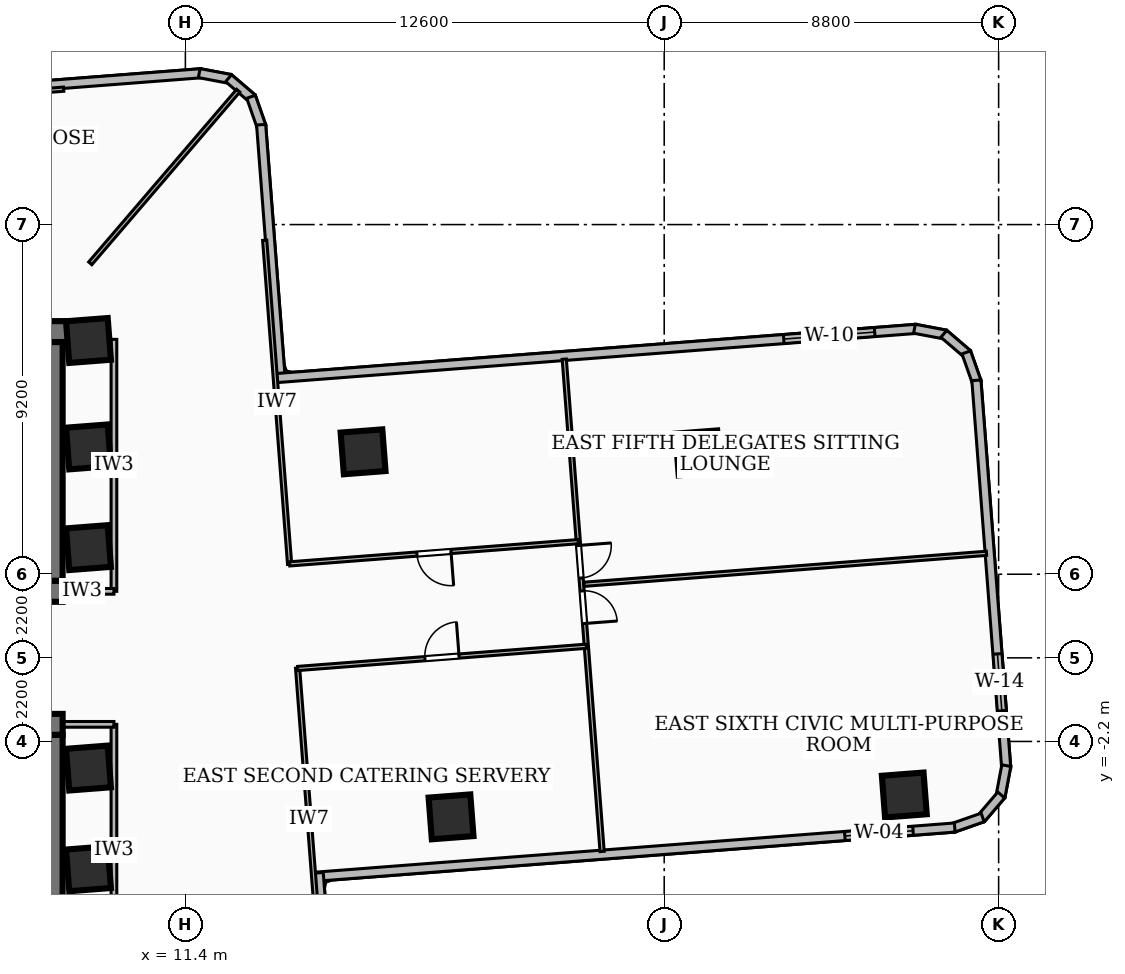
"""IFC4 building model, lengths in metres.
Left out: names, types, materials, properties, quantities, classifications, styles, units other than length and angle.
Written with IfcOpenShell. Run it as: python <this file> out.ifc"""

import sys

from ifc_helpers import new_model, si_unit, direction, frame, frame_2d, origin, origin_2d, place, context, subcontext, project, spatial, rectangle, extrude, element, fill, save


model = new_model("IFC4")
c1 = context("Model", 3, precision=1e-05, world=origin(), true_north=direction((0.0, 1.0)))
c2 = subcontext(c1, "Body", "Model", "MODEL_VIEW")
j1 = project(units=[si_unit("LENGTHUNIT", "METRE"), si_unit("PLANEANGLEUNIT", "RADIAN")], contexts=[c1])
p1 = place(None, origin())
s1 = spatial("IfcSite", under=j1, at=p1, CompositionType="ELEMENT")
p2 = place(p1, origin())
s2 = spatial("IfcBuilding", under=s1, at=p2, CompositionType="ELEMENT")
p3 = place(p2, frame((0.0, 0.0, 56.88)))
s3 = spatial("IfcBuildingStorey", under=s2, at=p3, CompositionType="ELEMENT", Elevation=56.88)
p4 = place(p3, frame((-8.78, 8.585, 0.0), z_axis=(0.0, 0.0, 1.0), x_axis=(1.0, 0.0, 0.0)))
e1 = element("IfcWall", 1, at=p4, inside=s3, PredefinedType="SHEAR", context=c2, shape_type="SweptSolid", body=[
    extrude(rectangle(XDim=17.56, YDim=0.55, at=frame_2d((8.78, 0.0))), origin(), (0.0, 0.0, 1.0), 3.32),
])
p5 = place(p3, frame((8.17, 1.75, 0.0), z_axis=(0.0, 0.0, 1.0), x_axis=(-1.0, 0.0, 0.0)))
e2 = element("IfcWall", 2, at=p5, inside=s3, PredefinedType="SHEAR", context=c2, shape_type="SweptSolid", body=[
    extrude(rectangle(XDim=16.34, YDim=0.55, at=frame_2d((8.17, 0.0))), origin(), (0.0, 0.0, 1.0), 3.32),
])
p6 = place(p5, frame((7.45, 0.0, 0.0)))
e3 = element("IfcOpeningElement", 3, at=p6, cuts=e2, PredefinedType="OPENING", context=c2, shape_type="SweptSolid", body=[
    extrude(rectangle(XDim=1.0, YDim=2.1, at=frame_2d((0.5, 1.05))), frame((0.0, 0.285, 0.0), z_axis=(0.0, -1.0, 0.0), x_axis=(1.0, 0.0, 0.0)), (0.0, 0.0, 1.0), 0.57),
])
p7 = place(p5, frame((3.4, 0.0, 0.0)))
e4 = element("IfcOpeningElement", 4, at=p7, cuts=e2, PredefinedType="OPENING", context=c2, shape_type="SweptSolid", body=[
    extrude(rectangle(XDim=0.9, YDim=2.06, at=frame_2d((0.45, 1.03))), frame((0.0, 0.285, 0.0), z_axis=(0.0, -1.0, 0.0), x_axis=(1.0, 0.0, 0.0)), (0.0, 0.0, 1.0), 0.57),
])
p8 = place(p5, frame((1.1, 0.0, 0.0)))
e5 = element("IfcOpeningElement", 5, at=p8, cuts=e2, PredefinedType="OPENING", context=c2, shape_type="SweptSolid", body=[
    extrude(rectangle(XDim=0.9, YDim=2.06, at=frame_2d((0.45, 1.03))), frame((0.0, 0.285, 0.0), z_axis=(0.0, -1.0, 0.0), x_axis=(1.0, 0.0, 0.0)), (0.0, 0.0, 1.0), 0.57),
])
p9 = place(p3, frame((7.895, 8.31, 0.0), z_axis=(0.0, 0.0, 1.0), x_axis=(0.0, -1.0, 0.0)))
e6 = element("IfcWall", 6, at=p9, inside=s3, PredefinedType="SHEAR", context=c2, shape_type="SweptSolid", body=[
    extrude(rectangle(XDim=6.285, YDim=0.55, at=frame_2d((3.143, 0.0))), origin(), (0.0, 0.0, 1.0), 3.32),
])
p10 = place(p3, frame((-8.17, -1.75, 0.0), z_axis=(0.0, 0.0, 1.0), x_axis=(1.0, 0.0, 0.0)))
e7 = element("IfcWall", 7, at=p10, inside=s3, PredefinedType="SHEAR", context=c2, shape_type="SweptSolid", body=[
    extrude(rectangle(XDim=16.34, YDim=0.55, at=frame_2d((8.17, 0.0))), origin(), (0.0, 0.0, 1.0), 3.32),
])
p11 = place(p10, frame((7.45, 0.0, 0.0)))
e8 = element("IfcOpeningElement", 8, at=p11, cuts=e7, PredefinedType="OPENING", context=c2, shape_type="SweptSolid", body=[
    extrude(rectangle(XDim=1.0, YDim=2.1, at=frame_2d((0.5, 1.05))), frame((0.0, 0.285, 0.0), z_axis=(0.0, -1.0, 0.0), x_axis=(1.0, 0.0, 0.0)), (0.0, 0.0, 1.0), 0.57),
])
p12 = place(p10, frame((10.965, 0.0, 0.0)))
e9 = element("IfcOpeningElement", 9, at=p12, cuts=e7, PredefinedType="OPENING", context=c2, shape_type="SweptSolid", body=[
    extrude(rectangle(XDim=1.05, YDim=2.15, at=frame_2d((0.525, 1.075))), frame((0.0, 0.285, 0.0), z_axis=(0.0, -1.0, 0.0), x_axis=(1.0, 0.0, 0.0)), (0.0, 0.0, 1.0), 0.57),
])
p13 = place(p10, frame((12.525, 0.0, 0.0)))
e10 = element("IfcOpeningElement", 10, at=p13, cuts=e7, PredefinedType="OPENING", context=c2, shape_type="SweptSolid", body=[
    extrude(rectangle(XDim=1.05, YDim=2.15, at=frame_2d((0.525, 1.075))), frame((0.0, 0.285, 0.0), z_axis=(0.0, -1.0, 0.0), x_axis=(1.0, 0.0, 0.0)), (0.0, 0.0, 1.0), 0.57),
])
p14 = place(p10, frame((14.085, 0.0, 0.0)))
e11 = element("IfcOpeningElement", 11, at=p14, cuts=e7, PredefinedType="OPENING", context=c2, shape_type="SweptSolid", body=[
    extrude(rectangle(XDim=1.05, YDim=2.15, at=frame_2d((0.525, 1.075))), frame((0.0, 0.285, 0.0), z_axis=(0.0, -1.0, 0.0), x_axis=(1.0, 0.0, 0.0)), (0.0, 0.0, 1.0), 0.57),
])
p15 = place(p3, frame((7.895, -2.025, 0.0), z_axis=(0.0, 0.0, 1.0), x_axis=(0.0, -1.0, 0.0)))
e12 = element("IfcWall", 12, at=p15, inside=s3, PredefinedType="SHEAR", context=c2, shape_type="SweptSolid", body=[
    extrude(rectangle(XDim=6.285, YDim=0.55, at=frame_2d((3.143, 0.0))), origin(), (0.0, 0.0, 1.0), 3.32),
])
for number, where, z_axis, x_axis in (
    (13, (8.85, -5.55, 0.0), (0.0, 0.0, 1.0), (0.997, 0.077, 0.0)),
    (14, (8.85, -2.9, 0.0), (0.0, 0.0, 1.0), (0.997, 0.077, 0.0)),
    (15, (8.85, 2.9, 0.0), (0.0, 0.0, 1.0), (0.997, 0.077, 0.0)),
    (16, (8.85, 5.55, 0.0), (0.0, 0.0, 1.0), (0.997, 0.077, 0.0)),
    (17, (8.85, 8.35, 0.0), (0.0, 0.0, 1.0), (0.997, 0.077, 0.0)),
    (18, (18.391, -4.184, 0.0), (0.0, 0.0, 1.0), (0.997, 0.077, 0.0)),
    (19, (16.076, 5.421, 0.0), (0.0, 0.0, 1.0), (0.997, 0.077, 0.0)),
    (20, (30.318, -3.609, 0.0), (0.0, 0.0, 1.0), (0.997, 0.077, 0.0)),
    (21, (24.888, 5.393, 0.0), (0.0, 0.0, 1.0), (0.997, 0.077, 0.0)),
):
    element("IfcColumn", number, at=place(p3, frame(where, z_axis=z_axis, x_axis=x_axis)), inside=s3, PredefinedType="COLUMN", context=c2, shape_type="SweptSolid", body=[
        extrude(rectangle(XDim=1.1, YDim=1.1, at=origin_2d()), origin(), (0.0, 0.0, 1.0), 3.6),
    ])
p16 = place(p3, frame((5.657, 14.908, 0.0), z_axis=(0.0, 0.0, 1.0), x_axis=(0.997048202977, 0.076778128006, 0.0)))
e22 = element("IfcWall", 22, at=p16, inside=s3, PredefinedType="SOLIDWALL", context=c2, shape_type="SweptSolid", body=[
    extrude(rectangle(XDim=6.175, YDim=0.24, at=frame_2d((3.088, 0.0))), origin(), (0.0, 0.0, 1.0), 2.401),
])
p17 = place(p3, frame((11.764, 15.385, 0.0), z_axis=(0.0, 0.0, 1.0), x_axis=(0.982688894005, -0.185263427582, 0.0)))
e23 = element("IfcWall", 23, at=p17, inside=s3, PredefinedType="SOLIDWALL", context=c2, shape_type="SweptSolid", body=[
    extrude(rectangle(XDim=0.832, YDim=0.24, at=frame_2d((0.416, 0.0))), origin(), (0.0, 0.0, 1.0), 3.32),
])
p18 = place(p3, frame((12.537, 15.252, 0.0), z_axis=(0.0, 0.0, 1.0), x_axis=(0.759616636226, -0.650371098657, 0.0)))
e24 = element("IfcWall", 24, at=p18, inside=s3, PredefinedType="SOLIDWALL", context=c2, shape_type="SweptSolid", body=[
    extrude(rectangle(XDim=0.813, YDim=0.24, at=frame_2d((0.407, 0.0))), origin(), (0.0, 0.0, 1.0), 3.32),
])
p19 = place(p3, frame((13.128, 14.763, 0.0), z_axis=(0.0, 0.0, 1.0), x_axis=(0.331174926, -0.943569376564, 0.0)))
e25 = element("IfcWall", 25, at=p19, inside=s3, PredefinedType="SOLIDWALL", context=c2, shape_type="SweptSolid", body=[
    extrude(rectangle(XDim=0.831, YDim=0.24, at=frame_2d((0.416, 0.0))), origin(), (0.0, 0.0, 1.0), 3.32),
])
p20 = place(p3, frame((13.393, 14.028, 0.0), z_axis=(0.0, 0.0, 1.0), x_axis=(0.076754366588, -0.997050032451, 0.0)))
e26 = element("IfcWall", 26, at=p20, inside=s3, PredefinedType="SOLIDWALL", context=c2, shape_type="SweptSolid", body=[
    extrude(rectangle(XDim=6.775, YDim=0.24, at=frame_2d((3.388, 0.0))), origin(), (0.0, 0.0, 1.0), 3.32),
])
p21 = place(p3, frame((13.81, 7.362, 0.0), z_axis=(0.0, 0.0, 1.0), x_axis=(0.997055761943, 0.076679903335, 0.0)))
e27 = element("IfcWall", 27, at=p21, inside=s3, PredefinedType="SOLIDWALL", context=c2, shape_type="SweptSolid", body=[
    extrude(rectangle(XDim=16.875, YDim=0.24, at=frame_2d((8.438, 0.0))), origin(), (0.0, 0.0, 1.0), 3.32),
])
p22 = place(p21, frame((13.375, 0.0, 0.85)))
e28 = element("IfcOpeningElement", 28, at=p22, cuts=e27, PredefinedType="OPENING", context=c2, shape_type="SweptSolid", body=[
    extrude(rectangle(XDim=2.4, YDim=1.65, at=frame_2d((1.2, 0.825))), frame((0.0, 0.13, 0.0), z_axis=(0.0, -1.0, 0.0), x_axis=(1.0, 0.0, 0.0)), (0.0, 0.0, 1.0), 0.26),
])
p23 = place(p3, frame((30.585, 8.659, 0.0), z_axis=(0.0, 0.0, 1.0), x_axis=(0.982688894005, -0.185263427582, 0.0)))
e29 = element("IfcWall", 29, at=p23, inside=s3, PredefinedType="SOLIDWALL", context=c2, shape_type="SweptSolid", body=[
    extrude(rectangle(XDim=0.832, YDim=0.24, at=frame_2d((0.416, 0.0))), origin(), (0.0, 0.0, 1.0), 3.32),
])
p24 = place(p3, frame((31.358, 8.526, 0.0), z_axis=(0.0, 0.0, 1.0), x_axis=(0.759891778471, -0.650049601962, 0.0)))
e30 = element("IfcWall", 30, at=p24, inside=s3, PredefinedType="SOLIDWALL", context=c2, shape_type="SweptSolid", body=[
    extrude(rectangle(XDim=0.813, YDim=0.24, at=frame_2d((0.407, 0.0))), origin(), (0.0, 0.0, 1.0), 3.32),
])
p25 = place(p3, frame((31.949, 8.037, 0.0), z_axis=(0.0, 0.0, 1.0), x_axis=(0.332128799234, -0.943234043448, 0.0)))
e31 = element("IfcWall", 31, at=p25, inside=s3, PredefinedType="SOLIDWALL", context=c2, shape_type="SweptSolid", body=[
    extrude(rectangle(XDim=0.831, YDim=0.24, at=frame_2d((0.416, 0.0))), origin(), (0.0, 0.0, 1.0), 3.32),
])
p26 = place(p3, frame((32.215, 7.302, 0.0), z_axis=(0.0, 0.0, 1.0), x_axis=(0.076720251263, -0.997052658111, 0.0)))
e32 = element("IfcWall", 32, at=p26, inside=s3, PredefinedType="SOLIDWALL", context=c2, shape_type="SweptSolid", body=[
    extrude(rectangle(XDim=10.218, YDim=0.24, at=frame_2d((5.109, 0.0))), origin(), (0.0, 0.0, 1.0), 3.32),
])
p27 = place(p26, frame((7.22, 0.0, 0.85)))
e33 = element("IfcOpeningElement", 33, at=p27, cuts=e32, PredefinedType="OPENING", context=c2, shape_type="SweptSolid", body=[
    extrude(rectangle(XDim=1.5, YDim=1.5, at=frame_2d((0.75, 0.75))), frame((0.0, 0.13, 0.0), z_axis=(0.0, -1.0, 0.0), x_axis=(1.0, 0.0, 0.0)), (0.0, 0.0, 1.0), 0.26),
])
p28 = place(p3, frame((33.002, -2.836, 0.0), z_axis=(0.0, 0.0, 1.0), x_axis=(-0.185263427582, -0.982688894005, 0.0)))
e34 = element("IfcWall", 34, at=p28, inside=s3, PredefinedType="SOLIDWALL", context=c2, shape_type="SweptSolid", body=[
    extrude(rectangle(XDim=0.832, YDim=0.24, at=frame_2d((0.416, 0.0))), origin(), (0.0, 0.0, 1.0), 3.32),
])
p29 = place(p3, frame((32.869, -3.609, 0.0), z_axis=(0.0, 0.0, 1.0), x_axis=(-0.650049601962, -0.759891778471, 0.0)))
e35 = element("IfcWall", 35, at=p29, inside=s3, PredefinedType="SOLIDWALL", context=c2, shape_type="SweptSolid", body=[
    extrude(rectangle(XDim=0.813, YDim=0.24, at=frame_2d((0.407, 0.0))), origin(), (0.0, 0.0, 1.0), 3.32),
])
p30 = place(p3, frame((32.38, -4.2, 0.0), z_axis=(0.0, 0.0, 1.0), x_axis=(-0.943569376564, -0.331174926, 0.0)))
e36 = element("IfcWall", 36, at=p30, inside=s3, PredefinedType="SOLIDWALL", context=c2, shape_type="SweptSolid", body=[
    extrude(rectangle(XDim=0.831, YDim=0.24, at=frame_2d((0.416, 0.0))), origin(), (0.0, 0.0, 1.0), 3.32),
])
p31 = place(p3, frame((31.645, -4.465, 0.0), z_axis=(0.0, 0.0, 1.0), x_axis=(-0.997051676532, -0.076733006752, 0.0)))
e37 = element("IfcWall", 37, at=p31, inside=s3, PredefinedType="SOLIDWALL", context=c2, shape_type="SweptSolid", body=[
    extrude(rectangle(XDim=16.876, YDim=0.24, at=frame_2d((8.438, 0.0))), origin(), (0.0, 0.0, 1.0), 3.32),
])
p32 = place(p31, frame((1.1, 0.0, 0.85)))
e38 = element("IfcOpeningElement", 38, at=p32, cuts=e37, PredefinedType="OPENING", context=c2, shape_type="SweptSolid", body=[
    extrude(rectangle(XDim=1.8, YDim=2.0, at=frame_2d((0.9, 1.0))), frame((0.0, 0.13, 0.0), z_axis=(0.0, -1.0, 0.0), x_axis=(1.0, 0.0, 0.0)), (0.0, 0.0, 1.0), 0.26),
])
p33 = place(p3, frame((14.908, -5.657, 0.0), z_axis=(0.0, 0.0, 1.0), x_axis=(0.076778128006, -0.997048202977, 0.0)))
e39 = element("IfcWall", 39, at=p33, inside=s3, PredefinedType="SOLIDWALL", context=c2, shape_type="SweptSolid", body=[
    extrude(rectangle(XDim=6.175, YDim=0.24, at=frame_2d((3.088, 0.0))), origin(), (0.0, 0.0, 1.0), 3.32),
])
p34 = place(p3, frame((9.52, 1.75, 0.0), z_axis=(0.0, 0.0, 1.0), x_axis=(0.0, 1.0, 0.0)))
e40 = element("IfcWall", 40, at=p34, inside=s3, PredefinedType="PARTITIONING", context=c2, shape_type="SweptSolid", body=[
    extrude(rectangle(XDim=6.63, YDim=0.15, at=frame_2d((3.315, 0.0))), origin(), (0.0, 0.0, 1.0), 2.401),
])
p35 = place(p3, frame((7.85, 1.75, 0.0), z_axis=(0.0, 0.0, 1.0), x_axis=(1.0, 0.0, 0.0)))
e41 = element("IfcWall", 41, at=p35, inside=s3, PredefinedType="PARTITIONING", context=c2, shape_type="SweptSolid", body=[
    extrude(rectangle(XDim=1.67, YDim=0.15, at=frame_2d((0.835, 0.0))), origin(), (0.0, 0.0, 1.0), 2.385),
])
p36 = place(p3, frame((9.52, -8.38, 0.0), z_axis=(0.0, 0.0, 1.0), x_axis=(0.0, 1.0, 0.0)))
e42 = element("IfcWall", 42, at=p36, inside=s3, PredefinedType="PARTITIONING", context=c2, shape_type="SweptSolid", body=[
    extrude(rectangle(XDim=6.63, YDim=0.15, at=frame_2d((3.315, 0.0))), origin(), (0.0, 0.0, 1.0), 2.401),
])
p37 = place(p3, frame((7.85, -1.75, 0.0), z_axis=(0.0, 0.0, 1.0), x_axis=(1.0, 0.0, 0.0)))
e43 = element("IfcWall", 43, at=p37, inside=s3, PredefinedType="PARTITIONING", context=c2, shape_type="SweptSolid", body=[
    extrude(rectangle(XDim=1.67, YDim=0.15, at=frame_2d((0.835, 0.0))), origin(), (0.0, 0.0, 1.0), 2.385),
])
p38 = place(p3, frame((8.897, 10.38, 0.0), z_axis=(0.0, 0.0, 1.0), x_axis=(0.650777932984, 0.759268122564, 0.0)))
e44 = element("IfcWall", 44, at=p38, inside=s3, PredefinedType="PARTITIONING", context=c2, shape_type="SweptSolid", body=[
    extrude(rectangle(XDim=5.984, YDim=0.11, at=frame_2d((2.992, 0.0))), origin(), (0.0, 0.0, 1.0), 3.32),
])
p39 = place(p3, frame((14.143, 2.462, 0.0), z_axis=(0.0, 0.0, 1.0), x_axis=(-0.076722700704, 0.997052469631, 0.0)))
e45 = element("IfcWall", 45, at=p39, inside=s3, PredefinedType="PARTITIONING", context=c2, shape_type="SweptSolid", body=[
    extrude(rectangle(XDim=8.55, YDim=0.11, at=frame_2d((4.275, 0.0))), origin(), (0.0, 0.0, 1.0), 2.401),
])
p40 = place(p3, frame((14.963, -8.197, 0.0), z_axis=(0.0, 0.0, 1.0), x_axis=(-0.076708240121, 0.99705358226, 0.0)))
e46 = element("IfcWall", 46, at=p40, inside=s3, PredefinedType="PARTITIONING", context=c2, shape_type="SweptSolid", body=[
    extrude(rectangle(XDim=7.95, YDim=0.11, at=frame_2d((3.975, 0.0))), origin(), (0.0, 0.0, 1.0), 2.401),
])
p41 = place(p3, frame((21.74, 3.057, 0.0), z_axis=(0.0, 0.0, 1.0), x_axis=(-0.997049394946, -0.076762647418, 0.0)))
e47 = element("IfcWall", 47, at=p41, inside=s3, PredefinedType="PARTITIONING", context=c2, shape_type="SweptSolid", body=[
    extrude(rectangle(XDim=7.62, YDim=0.11, at=frame_2d((3.81, 0.0))), origin(), (0.0, 0.0, 1.0), 3.32),
])
p42 = place(p41, frame((3.36, 0.0, 0.0)))
e48 = element("IfcOpeningElement", 48, at=p42, cuts=e47, PredefinedType="OPENING", context=c2, shape_type="SweptSolid", body=[
    extrude(rectangle(XDim=0.9, YDim=2.06, at=frame_2d((0.45, 1.03))), frame((0.0, 0.065, 0.0), z_axis=(0.0, -1.0, 0.0), x_axis=(1.0, 0.0, 0.0)), (0.0, 0.0, 1.0), 0.13),
])
p43 = place(p3, frame((14.354, -0.28, 0.0), z_axis=(0.0, 0.0, 1.0), x_axis=(0.997048639669, 0.076772456877, 0.0)))
e49 = element("IfcWall", 49, at=p43, inside=s3, PredefinedType="PARTITIONING", context=c2, shape_type="SweptSolid", body=[
    extrude(rectangle(XDim=7.619, YDim=0.11, at=frame_2d((3.81, 0.0))), origin(), (0.0, 0.0, 1.0), 3.32),
])
p44 = place(p43, frame((3.36, 0.0, 0.0)))
e50 = element("IfcOpeningElement", 50, at=p44, cuts=e49, PredefinedType="OPENING", context=c2, shape_type="SweptSolid", body=[
    extrude(rectangle(XDim=0.9, YDim=2.06, at=frame_2d((0.45, 1.03))), frame((0.0, 0.065, 0.0), z_axis=(0.0, -1.0, 0.0), x_axis=(1.0, 0.0, 0.0)), (0.0, 0.0, 1.0), 0.13),
])
p45 = place(p3, frame((21.886, 1.935, 0.0), z_axis=(0.0, 0.0, 1.0), x_axis=(0.997054350339, 0.076698255973, 0.0)))
e51 = element("IfcWall", 51, at=p45, inside=s3, PredefinedType="PARTITIONING", context=c2, shape_type="SweptSolid", body=[
    extrude(rectangle(XDim=10.625, YDim=0.11, at=frame_2d((5.312, 0.0))), origin(), (0.0, 0.0, 1.0), 2.812),
])
p46 = place(p3, frame((21.37, 7.858, 0.0), z_axis=(0.0, 0.0, 1.0), x_axis=(0.076662005745, -0.99705713822, 0.0)))
e52 = element("IfcWall", 52, at=p46, inside=s3, PredefinedType="PARTITIONING", context=c2, shape_type="SweptSolid", body=[
    extrude(rectangle(XDim=12.99, YDim=0.11, at=frame_2d((6.495, 0.0))), origin(), (0.0, 0.0, 1.0), 2.401),
])
p47 = place(p46, frame((6.115, 0.0, 0.0)))
e53 = element("IfcOpeningElement", 53, at=p47, cuts=e52, PredefinedType="OPENING", context=c2, shape_type="SweptSolid", body=[
    extrude(rectangle(XDim=0.86, YDim=2.04, at=frame_2d((0.43, 1.02))), frame((0.0, 0.065, 0.0), z_axis=(0.0, -1.0, 0.0), x_axis=(1.0, 0.0, 0.0)), (0.0, 0.0, 1.0), 0.13),
])
p48 = place(p46, frame((4.915, 0.0, 0.0)))
e54 = element("IfcOpeningElement", 54, at=p48, cuts=e52, PredefinedType="OPENING", context=c2, shape_type="SweptSolid", body=[
    extrude(rectangle(XDim=0.86, YDim=2.04, at=frame_2d((0.43, 1.02))), frame((0.0, 0.065, 0.0), z_axis=(0.0, -1.0, 0.0), x_axis=(1.0, 0.0, 0.0)), (0.0, 0.0, 1.0), 0.13),
])
p49 = place(p3, frame((8.197, 14.963, 0.0), z_axis=(0.0, 0.0, 1.0), x_axis=(-0.99705358226, -0.076708240121, 0.0)))
e55 = element("IfcWall", 55, at=p49, inside=s3, PredefinedType="PARTITIONING", context=c2, shape_type="SweptSolid", body=[
    extrude(rectangle(XDim=7.95, YDim=0.11, at=frame_2d((3.975, 0.0))), origin(), (0.0, 0.0, 1.0), 2.401),
])
p50 = place(p22, origin())
e56 = element("IfcWindow", 56, at=p50, inside=s3, PartitioningType="SINGLE_PANEL", PredefinedType="WINDOW", context=c2, shape_type="SweptSolid", body=[
    extrude(rectangle(XDim=2.4, YDim=1.65, at=frame_2d((1.2, 0.825))), frame((0.0, 0.03, 0.0), z_axis=(0.0, -1.0, 0.0), x_axis=(1.0, 0.0, 0.0)), (0.0, 0.0, 1.0), 0.06),
])
fill(e28, e56)
p51 = place(p27, origin())
e57 = element("IfcWindow", 57, at=p51, inside=s3, PartitioningType="SINGLE_PANEL", PredefinedType="WINDOW", context=c2, shape_type="SweptSolid", body=[
    extrude(rectangle(XDim=1.5, YDim=1.5, at=frame_2d((0.75, 0.75))), frame((0.0, 0.03, 0.0), z_axis=(0.0, -1.0, 0.0), x_axis=(1.0, 0.0, 0.0)), (0.0, 0.0, 1.0), 0.06),
])
fill(e33, e57)
p52 = place(p32, origin())
e58 = element("IfcWindow", 58, at=p52, inside=s3, PartitioningType="SINGLE_PANEL", PredefinedType="WINDOW", context=c2, shape_type="SweptSolid", body=[
    extrude(rectangle(XDim=1.8, YDim=2.0, at=frame_2d((0.9, 1.0))), frame((0.0, 0.03, 0.0), z_axis=(0.0, -1.0, 0.0), x_axis=(1.0, 0.0, 0.0)), (0.0, 0.0, 1.0), 0.06),
])
fill(e38, e58)
p53 = place(p42, origin())
e59 = element("IfcDoor", 59, at=p53, inside=s3, OperationType="SINGLE_SWING_LEFT", PredefinedType="DOOR", context=c2, shape_type="SweptSolid", body=[
    extrude(rectangle(XDim=0.9, YDim=2.06, at=frame_2d((0.45, 1.03))), frame((0.0, 0.025, 0.0), z_axis=(0.0, -1.0, 0.0), x_axis=(1.0, 0.0, 0.0)), (0.0, 0.0, 1.0), 0.05),
])
fill(e48, e59)
p54 = place(p44, origin())
e60 = element("IfcDoor", 60, at=p54, inside=s3, OperationType="SINGLE_SWING_RIGHT", PredefinedType="DOOR", context=c2, shape_type="SweptSolid", body=[
    extrude(rectangle(XDim=0.9, YDim=2.06, at=frame_2d((0.45, 1.03))), frame((0.0, 0.025, 0.0), z_axis=(0.0, -1.0, 0.0), x_axis=(1.0, 0.0, 0.0)), (0.0, 0.0, 1.0), 0.05),
])
fill(e50, e60)
p55 = place(p47, origin())
e61 = element("IfcDoor", 61, at=p55, inside=s3, OperationType="SINGLE_SWING_RIGHT", PredefinedType="DOOR", context=c2, shape_type="SweptSolid", body=[
    extrude(rectangle(XDim=0.86, YDim=2.04, at=frame_2d((0.43, 1.02))), frame((0.0, 0.025, 0.0), z_axis=(0.0, -1.0, 0.0), x_axis=(1.0, 0.0, 0.0)), (0.0, 0.0, 1.0), 0.05),
])
fill(e53, e61)
p56 = place(p48, origin())
e62 = element("IfcDoor", 62, at=p56, inside=s3, OperationType="SINGLE_SWING_LEFT", PredefinedType="DOOR", context=c2, shape_type="SweptSolid", body=[
    extrude(rectangle(XDim=0.86, YDim=2.04, at=frame_2d((0.43, 1.02))), frame((0.0, 0.025, 0.0), z_axis=(0.0, -1.0, 0.0), x_axis=(1.0, 0.0, 0.0)), (0.0, 0.0, 1.0), 0.05),
])
fill(e54, e62)
save(model, sys.argv[1])
